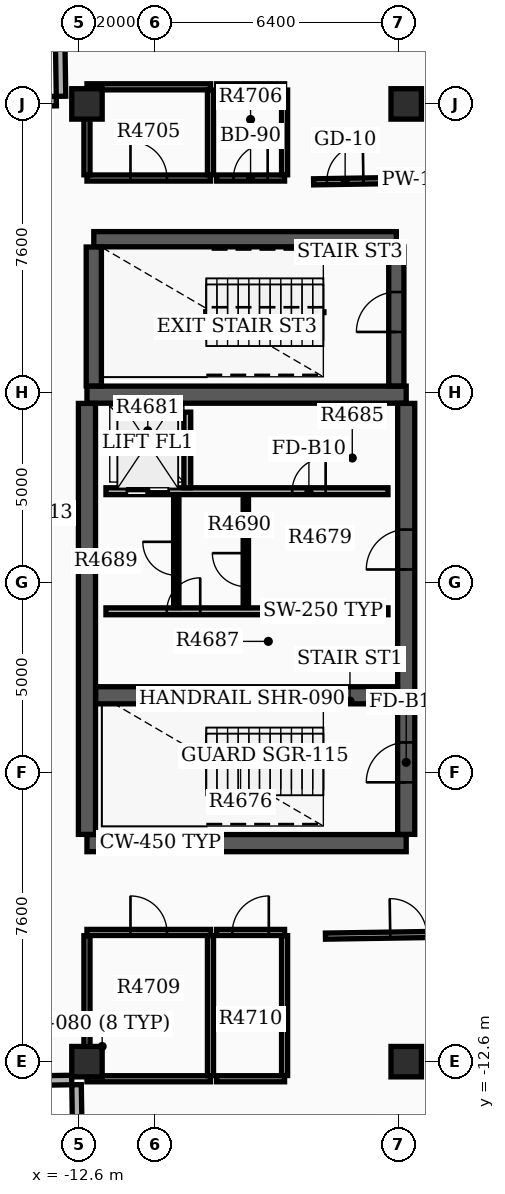
"""IFC4 building model, lengths in metres.
Left out: names, types, materials, properties, quantities, classifications, styles, units other than length and angle.
Written with IfcOpenShell. Run it as: python <this file> out.ifc"""

import sys

from ifc_helpers import new_model, si_unit, direction, frame, frame_2d, origin, origin_2d, place, context, subcontext, project, spatial, rectangle, extrude, element, fill, save


model = new_model("IFC4")
c1 = context("Model", 3, precision=1e-05, world=origin(), true_north=direction((0.0, 1.0)))
c2 = subcontext(c1, "Body", "Model", "MODEL_VIEW")
j1 = project(units=[si_unit("LENGTHUNIT", "METRE"), si_unit("PLANEANGLEUNIT", "RADIAN")], contexts=[c1])
p1 = place(None, origin())
s1 = spatial("IfcSite", under=j1, at=p1, CompositionType="ELEMENT")
p2 = place(p1, origin())
s2 = spatial("IfcBuilding", under=s1, at=p2, CompositionType="ELEMENT")
p3 = place(p2, frame((0.0, 0.0, 303.9)))
s3 = spatial("IfcBuildingStorey", under=s2, at=p3, CompositionType="ELEMENT", Elevation=303.9)
for number, where, z_axis, x_axis in (
    (1, (-12.4, -6.85, 0.0), (0.0, 0.0, 1.0), (1.0, 0.0, 0.0)),
    (2, (-12.4, 4.95, 0.0), (0.0, 0.0, 1.0), (1.0, 0.0, 0.0)),
):
    element("IfcWall", number, at=place(p3, frame(where, z_axis=z_axis, x_axis=x_axis)), inside=s3, PredefinedType="SHEAR", context=c2, shape_type="SweptSolid", body=[
        extrude(rectangle(XDim=8.4, YDim=0.45, at=frame_2d((4.2, 0.0))), origin(), (0.0, 0.0, 1.0), 4.25),
    ])
p4 = place(p3, frame((-12.4, -6.62, 0.0), z_axis=(0.0, 0.0, 1.0), x_axis=(0.0, 1.0, 0.0)))
e3 = element("IfcWall", 3, at=p4, inside=s3, PredefinedType="SHEAR", context=c2, shape_type="SweptSolid", body=[
    extrude(rectangle(XDim=11.34, YDim=0.45, at=frame_2d((5.67, 0.0))), origin(), (0.0, 0.0, 1.0), 4.25),
])
p5 = place(p3, frame((-4.0, -6.62, 0.0), z_axis=(0.0, 0.0, 1.0), x_axis=(0.0, 1.0, 0.0)))
e4 = element("IfcWall", 4, at=p5, inside=s3, PredefinedType="SHEAR", context=c2, shape_type="SweptSolid", body=[
    extrude(rectangle(XDim=11.34, YDim=0.45, at=frame_2d((5.67, 0.0))), origin(), (0.0, 0.0, 1.0), 4.25),
])
p6 = place(p5, frame((1.37, 0.0, 0.0)))
e5 = element("IfcOpeningElement", 5, at=p6, cuts=e4, PredefinedType="OPENING", context=c2, shape_type="SweptSolid", body=[
    extrude(rectangle(XDim=1.05, YDim=2.15, at=frame_2d((0.525, 1.075))), frame((0.0, 0.235, 0.0), z_axis=(0.0, -1.0, 0.0), x_axis=(1.0, 0.0, 0.0)), (0.0, 0.0, 1.0), 0.47),
])
p7 = place(p5, frame((6.97, 0.0, 0.0)))
e6 = element("IfcOpeningElement", 6, at=p7, cuts=e4, PredefinedType="OPENING", context=c2, shape_type="SweptSolid", body=[
    extrude(rectangle(XDim=1.05, YDim=2.15, at=frame_2d((0.525, 1.075))), frame((0.0, 0.235, 0.0), z_axis=(0.0, -1.0, 0.0), x_axis=(1.0, 0.0, 0.0)), (0.0, 0.0, 1.0), 0.47),
])
p8 = place(p3, frame((-12.17, -2.96, 0.0), z_axis=(0.0, 0.0, 1.0), x_axis=(1.0, 0.0, 0.0)))
e7 = element("IfcWall", 7, at=p8, inside=s3, PredefinedType="SHEAR", context=c2, shape_type="SweptSolid", body=[
    extrude(rectangle(XDim=7.94, YDim=0.45, at=frame_2d((3.97, 0.0))), origin(), (0.0, 0.0, 1.0), 4.25),
])
p9 = place(p3, frame((-12.22, 9.04, 0.0), z_axis=(0.0, 0.0, 1.0), x_axis=(1.0, 0.0, 0.0)))
e8 = element("IfcWall", 8, at=p9, inside=s3, PredefinedType="SHEAR", context=c2, shape_type="SweptSolid", body=[
    extrude(rectangle(XDim=7.96, YDim=0.4, at=frame_2d((3.98, 0.0))), origin(), (0.0, 0.0, 1.0), 4.25),
])
p10 = place(p3, frame((-12.22, 5.18, 0.0), z_axis=(0.0, 0.0, 1.0), x_axis=(0.0, 1.0, 0.0)))
e9 = element("IfcWall", 9, at=p10, inside=s3, PredefinedType="SHEAR", context=c2, shape_type="SweptSolid", body=[
    extrude(rectangle(XDim=3.655, YDim=0.4, at=frame_2d((1.828, 0.0))), origin(), (0.0, 0.0, 1.0), 4.25),
])
p11 = place(p3, frame((-4.26, 5.18, 0.0), z_axis=(0.0, 0.0, 1.0), x_axis=(0.0, 1.0, 0.0)))
e10 = element("IfcWall", 10, at=p11, inside=s3, PredefinedType="SHEAR", context=c2, shape_type="SweptSolid", body=[
    extrude(rectangle(XDim=3.655, YDim=0.4, at=frame_2d((1.828, 0.0))), origin(), (0.0, 0.0, 1.0), 4.25),
])
p12 = place(p11, frame((1.42, 0.0, 0.0)))
e11 = element("IfcOpeningElement", 11, at=p12, cuts=e10, PredefinedType="OPENING", context=c2, shape_type="SweptSolid", body=[
    extrude(rectangle(XDim=1.05, YDim=2.15, at=frame_2d((0.525, 1.075))), frame((0.0, 0.21, 0.0), z_axis=(0.0, -1.0, 0.0), x_axis=(1.0, 0.0, 0.0)), (0.0, 0.0, 1.0), 0.42),
])
for number, where, z_axis, x_axis in (
    (12, (-12.4, -12.6, 0.0), (0.0, 0.0, 1.0), (1.0, 0.0, 0.0)),
    (13, (-12.4, 12.6, 0.0), (0.0, 0.0, 1.0), (1.0, 0.0, 0.0)),
    (14, (-4.0, -12.6, 0.0), (0.0, 0.0, 1.0), (1.0, 0.0, 0.0)),
    (15, (-4.0, 12.6, 0.0), (0.0, 0.0, 1.0), (1.0, 0.0, 0.0)),
):
    element("IfcColumn", number, at=place(p3, frame(where, z_axis=z_axis, x_axis=x_axis)), inside=s3, PredefinedType="COLUMN", context=c2, shape_type="SweptSolid", body=[
        extrude(rectangle(XDim=0.8, YDim=0.8, at=origin_2d()), origin(), (0.0, 0.0, 1.0), 4.5),
    ])
p13 = place(p3, frame((-14.456, 12.655, 0.0), z_axis=(0.0, 0.0, 1.0), x_axis=(0.999877904354, 0.015626144237, 0.0)))
e16 = element("IfcWall", 16, at=p13, inside=s3, PredefinedType="STANDARD", context=c2, shape_type="SweptSolid", body=[
    extrude(rectangle(XDim=1.25, YDim=0.25, at=frame_2d((0.625, 0.0))), origin(), (0.0, 0.0, 1.0), 3.73),
])
p14 = place(p3, frame((-13.083, 12.801, 0.0), z_axis=(0.0, 0.0, 1.0), x_axis=(-0.015625635615, 0.999877912303, 0.0)))
e17 = element("IfcWall", 17, at=p14, inside=s3, PredefinedType="STANDARD", context=c2, shape_type="SweptSolid", body=[
    extrude(rectangle(XDim=1.5, YDim=0.25, at=frame_2d((0.75, 0.0))), origin(), (0.0, 0.0, 1.0), 3.73),
])
p15 = place(p3, frame((-14.051, -13.102, 0.0), z_axis=(0.0, 0.0, 1.0), x_axis=(0.999877904354, 0.015626144237, 0.0)))
e18 = element("IfcWall", 18, at=p15, inside=s3, PredefinedType="STANDARD", context=c2, shape_type="SweptSolid", body=[
    extrude(rectangle(XDim=1.25, YDim=0.25, at=frame_2d((0.625, 0.0))), origin(), (0.0, 0.0, 1.0), 3.73),
])
p16 = place(p3, frame((-12.674, -13.206, 0.0), z_axis=(0.0, 0.0, 1.0), x_axis=(0.015625635615, -0.999877912303, 0.0)))
e19 = element("IfcWall", 19, at=p16, inside=s3, PredefinedType="STANDARD", context=c2, shape_type="SweptSolid", body=[
    extrude(rectangle(XDim=1.5, YDim=0.25, at=frame_2d((0.75, 0.0))), origin(), (0.0, 0.0, 1.0), 3.73),
])
p17 = place(p3, frame((-11.9, 2.41, 0.0), z_axis=(0.0, 0.0, 1.0), x_axis=(1.0, 0.0, 0.0)))
e20 = element("IfcWall", 20, at=p17, inside=s3, PredefinedType="SOLIDWALL", context=c2, shape_type="SweptSolid", body=[
    extrude(rectangle(XDim=7.42, YDim=0.18, at=frame_2d((3.71, 0.0))), origin(), (0.0, 0.0, 1.0), 3.72),
])
p18 = place(p17, frame((0.55, 0.0, 0.0)))
e21 = element("IfcOpeningElement", 21, at=p18, cuts=e20, PredefinedType="OPENING", context=c2, shape_type="SweptSolid", body=[
    extrude(rectangle(XDim=1.1, YDim=2.15, at=frame_2d((0.55, 1.075))), frame((0.0, 0.1, 0.0), z_axis=(0.0, -1.0, 0.0), x_axis=(1.0, 0.0, 0.0)), (0.0, 0.0, 1.0), 0.2),
])
p19 = place(p17, frame((4.9, 0.0, 0.0)))
e22 = element("IfcOpeningElement", 22, at=p19, cuts=e20, PredefinedType="OPENING", context=c2, shape_type="SweptSolid", body=[
    extrude(rectangle(XDim=0.88, YDim=2.1, at=frame_2d((0.44, 1.05))), frame((0.0, 0.1, 0.0), z_axis=(0.0, -1.0, 0.0), x_axis=(1.0, 0.0, 0.0)), (0.0, 0.0, 1.0), 0.2),
])
p20 = place(p3, frame((-11.9, -0.75, 0.0), z_axis=(0.0, 0.0, 1.0), x_axis=(1.0, 0.0, 0.0)))
e23 = element("IfcWall", 23, at=p20, inside=s3, PredefinedType="SOLIDWALL", context=c2, shape_type="SweptSolid", body=[
    extrude(rectangle(XDim=7.42, YDim=0.18, at=frame_2d((3.71, 0.0))), origin(), (0.0, 0.0, 1.0), 3.72),
])
p21 = place(p20, frame((1.6, 0.0, 0.0)))
e24 = element("IfcOpeningElement", 24, at=p21, cuts=e23, PredefinedType="OPENING", context=c2, shape_type="SweptSolid", body=[
    extrude(rectangle(XDim=0.88, YDim=2.1, at=frame_2d((0.44, 1.05))), frame((0.0, 0.1, 0.0), z_axis=(0.0, -1.0, 0.0), x_axis=(1.0, 0.0, 0.0)), (0.0, 0.0, 1.0), 0.2),
])
p22 = place(p3, frame((-9.76, 2.5, 0.0), z_axis=(0.0, 0.0, 1.0), x_axis=(0.0, 1.0, 0.0)))
e25 = element("IfcWall", 25, at=p22, inside=s3, PredefinedType="SOLIDWALL", context=c2, shape_type="SweptSolid", body=[
    extrude(rectangle(XDim=1.99, YDim=0.18, at=frame_2d((0.995, 0.0))), origin(), (0.0, 0.0, 1.0), 3.72),
])
p23 = place(p3, frame((-8.22, -0.65, 0.0), z_axis=(0.0, 0.0, 1.0), x_axis=(0.0, 1.0, 0.0)))
e26 = element("IfcWall", 26, at=p23, inside=s3, PredefinedType="SOLIDWALL", context=c2, shape_type="SweptSolid", body=[
    extrude(rectangle(XDim=2.96, YDim=0.14, at=frame_2d((1.48, 0.0))), origin(), (0.0, 0.0, 1.0), 3.72),
])
p24 = place(p23, frame((0.55, 0.0, 0.0)))
e27 = element("IfcOpeningElement", 27, at=p24, cuts=e26, PredefinedType="OPENING", context=c2, shape_type="SweptSolid", body=[
    extrude(rectangle(XDim=0.88, YDim=2.1, at=frame_2d((0.44, 1.05))), frame((0.0, 0.08, 0.0), z_axis=(0.0, -1.0, 0.0), x_axis=(1.0, 0.0, 0.0)), (0.0, 0.0, 1.0), 0.16),
])
p25 = place(p3, frame((-10.05, -0.652, 0.0), z_axis=(0.0, 0.0, 1.0), x_axis=(0.0, 1.0, 0.0)))
e28 = element("IfcWall", 28, at=p25, inside=s3, PredefinedType="PARTITIONING", context=c2, shape_type="SweptSolid", body=[
    extrude(rectangle(XDim=2.962, YDim=0.14, at=frame_2d((1.481, 0.0))), origin(), (0.0, 0.0, 1.0), 3.72),
])
p26 = place(p25, frame((0.85, 0.0, 0.0)))
e29 = element("IfcOpeningElement", 29, at=p26, cuts=e28, PredefinedType="OPENING", context=c2, shape_type="SweptSolid", body=[
    extrude(rectangle(XDim=0.88, YDim=2.1, at=frame_2d((0.44, 1.05))), frame((0.0, 0.08, 0.0), z_axis=(0.0, -1.0, 0.0), x_axis=(1.0, 0.0, 0.0)), (0.0, 0.0, 1.0), 0.16),
])
p27 = place(p3, frame((-6.437, 10.55, 0.0), z_axis=(0.0, 0.0, 1.0), x_axis=(0.999876776552, 0.015698143603, 0.0)))
e30 = element("IfcWall", 30, at=p27, inside=s3, PredefinedType="PARTITIONING", context=c2, shape_type="SweptSolid", body=[
    extrude(rectangle(XDim=4.37, YDim=0.16, at=frame_2d((2.185, 0.0))), origin(), (0.0, 0.0, 1.0), 3.72),
])
p28 = place(p27, frame((0.35, 0.0, 0.0)))
e31 = element("IfcOpeningElement", 31, at=p28, cuts=e30, PredefinedType="OPENING", context=c2, shape_type="SweptSolid", body=[
    extrude(rectangle(XDim=0.96, YDim=2.15, at=frame_2d((0.48, 1.075))), frame((0.0, 0.09, 0.0), z_axis=(0.0, -1.0, 0.0), x_axis=(1.0, 0.0, 0.0)), (0.0, 0.0, 1.0), 0.18),
])
p29 = place(p3, frame((-6.125, -9.297, 0.0), z_axis=(0.0, 0.0, 1.0), x_axis=(0.999876762784, 0.015699020525, 0.0)))
e32 = element("IfcWall", 32, at=p29, inside=s3, PredefinedType="PARTITIONING", context=c2, shape_type="SweptSolid", body=[
    extrude(rectangle(XDim=4.37, YDim=0.16, at=frame_2d((2.185, 0.0))), origin(), (0.0, 0.0, 1.0), 3.72),
])
p30 = place(p29, frame((1.705, 0.0, 0.0)))
e33 = element("IfcOpeningElement", 33, at=p30, cuts=e32, PredefinedType="OPENING", context=c2, shape_type="SweptSolid", body=[
    extrude(rectangle(XDim=0.96, YDim=2.15, at=frame_2d((0.48, 1.075))), frame((0.0, 0.09, 0.0), z_axis=(0.0, -1.0, 0.0), x_axis=(1.0, 0.0, 0.0)), (0.0, 0.0, 1.0), 0.18),
])
p31 = place(p3, frame((-12.4, 10.65, 0.0), z_axis=(0.0, 0.0, 1.0), x_axis=(1.0, 0.0, 0.0)))
e34 = element("IfcWall", 34, at=p31, inside=s3, PredefinedType="PARTITIONING", context=c2, shape_type="SweptSolid", body=[
    extrude(rectangle(XDim=3.25, YDim=0.16, at=frame_2d((1.625, 0.0))), origin(), (0.0, 0.0, 1.0), 3.72),
])
p32 = place(p31, frame((1.145, 0.0, 0.0)))
e35 = element("IfcOpeningElement", 35, at=p32, cuts=e34, PredefinedType="OPENING", context=c2, shape_type="SweptSolid", body=[
    extrude(rectangle(XDim=0.96, YDim=2.15, at=frame_2d((0.48, 1.075))), frame((0.0, 0.09, 0.0), z_axis=(0.0, -1.0, 0.0), x_axis=(1.0, 0.0, 0.0)), (0.0, 0.0, 1.0), 0.18),
])
p33 = place(p3, frame((-12.4, 13.05, 0.0), z_axis=(0.0, 0.0, 1.0), x_axis=(1.0, 0.0, 0.0)))
e36 = element("IfcWall", 36, at=p33, inside=s3, PredefinedType="PARTITIONING", context=c2, shape_type="SweptSolid", body=[
    extrude(rectangle(XDim=3.25, YDim=0.16, at=frame_2d((1.625, 0.0))), origin(), (0.0, 0.0, 1.0), 3.72),
])
for number, where, z_axis, x_axis in (
    (37, (-12.4, 10.735, 0.0), (0.0, 0.0, 1.0), (0.0, 1.0, 0.0)),
    (38, (-9.15, 10.735, 0.0), (0.0, 0.0, 1.0), (0.0, 1.0, 0.0)),
):
    element("IfcWall", number, at=place(p3, frame(where, z_axis=z_axis, x_axis=x_axis)), inside=s3, PredefinedType="PARTITIONING", context=c2, shape_type="SweptSolid", body=[
        extrude(rectangle(XDim=2.23, YDim=0.16, at=frame_2d((1.115, 0.0))), origin(), (0.0, 0.0, 1.0), 3.72),
    ])
p34 = place(p3, frame((-8.99, 10.65, 0.0), z_axis=(0.0, 0.0, 1.0), x_axis=(1.0, 0.0, 0.0)))
e39 = element("IfcWall", 39, at=p34, inside=s3, PredefinedType="PARTITIONING", context=c2, shape_type="SweptSolid", body=[
    extrude(rectangle(XDim=1.79, YDim=0.16, at=frame_2d((0.895, 0.0))), origin(), (0.0, 0.0, 1.0), 3.72),
])
p35 = place(p34, frame((0.445, 0.0, 0.0)))
e40 = element("IfcOpeningElement", 40, at=p35, cuts=e39, PredefinedType="OPENING", context=c2, shape_type="SweptSolid", body=[
    extrude(rectangle(XDim=0.9, YDim=2.15, at=frame_2d((0.45, 1.075))), frame((0.0, 0.09, 0.0), z_axis=(0.0, -1.0, 0.0), x_axis=(1.0, 0.0, 0.0)), (0.0, 0.0, 1.0), 0.18),
])
p36 = place(p3, frame((-8.99, 13.05, 0.0), z_axis=(0.0, 0.0, 1.0), x_axis=(1.0, 0.0, 0.0)))
e41 = element("IfcWall", 41, at=p36, inside=s3, PredefinedType="PARTITIONING", context=c2, shape_type="SweptSolid", body=[
    extrude(rectangle(XDim=1.79, YDim=0.16, at=frame_2d((0.895, 0.0))), origin(), (0.0, 0.0, 1.0), 3.72),
])
p37 = place(p3, frame((-7.2, 10.735, 0.0), z_axis=(0.0, 0.0, 1.0), x_axis=(0.0, 1.0, 0.0)))
e42 = element("IfcWall", 42, at=p37, inside=s3, PredefinedType="PARTITIONING", context=c2, shape_type="SweptSolid", body=[
    extrude(rectangle(XDim=2.23, YDim=0.16, at=frame_2d((1.115, 0.0))), origin(), (0.0, 0.0, 1.0), 3.72),
])
p38 = place(p3, frame((-12.4, -13.05, 0.0), z_axis=(0.0, 0.0, 1.0), x_axis=(1.0, 0.0, 0.0)))
e43 = element("IfcWall", 43, at=p38, inside=s3, PredefinedType="PARTITIONING", context=c2, shape_type="SweptSolid", body=[
    extrude(rectangle(XDim=3.25, YDim=0.16, at=frame_2d((1.625, 0.0))), origin(), (0.0, 0.0, 1.0), 3.72),
])
p39 = place(p3, frame((-12.4, -9.2, 0.0), z_axis=(0.0, 0.0, 1.0), x_axis=(1.0, 0.0, 0.0)))
e44 = element("IfcWall", 44, at=p39, inside=s3, PredefinedType="PARTITIONING", context=c2, shape_type="SweptSolid", body=[
    extrude(rectangle(XDim=3.25, YDim=0.16, at=frame_2d((1.625, 0.0))), origin(), (0.0, 0.0, 1.0), 3.72),
])
p40 = place(p39, frame((1.145, 0.0, 0.0)))
e45 = element("IfcOpeningElement", 45, at=p40, cuts=e44, PredefinedType="OPENING", context=c2, shape_type="SweptSolid", body=[
    extrude(rectangle(XDim=0.96, YDim=2.15, at=frame_2d((0.48, 1.075))), frame((0.0, 0.09, 0.0), z_axis=(0.0, -1.0, 0.0), x_axis=(1.0, 0.0, 0.0)), (0.0, 0.0, 1.0), 0.18),
])
for number, where, z_axis, x_axis in (
    (46, (-12.4, -12.965, 0.0), (0.0, 0.0, 1.0), (0.0, 1.0, 0.0)),
    (47, (-9.15, -12.965, 0.0), (0.0, 0.0, 1.0), (0.0, 1.0, 0.0)),
):
    element("IfcWall", number, at=place(p3, frame(where, z_axis=z_axis, x_axis=x_axis)), inside=s3, PredefinedType="PARTITIONING", context=c2, shape_type="SweptSolid", body=[
        extrude(rectangle(XDim=3.68, YDim=0.16, at=frame_2d((1.84, 0.0))), origin(), (0.0, 0.0, 1.0), 3.72),
    ])
p41 = place(p3, frame((-8.99, -13.05, 0.0), z_axis=(0.0, 0.0, 1.0), x_axis=(1.0, 0.0, 0.0)))
e48 = element("IfcWall", 48, at=p41, inside=s3, PredefinedType="PARTITIONING", context=c2, shape_type="SweptSolid", body=[
    extrude(rectangle(XDim=1.79, YDim=0.16, at=frame_2d((0.895, 0.0))), origin(), (0.0, 0.0, 1.0), 3.72),
])
p42 = place(p3, frame((-8.99, -9.2, 0.0), z_axis=(0.0, 0.0, 1.0), x_axis=(1.0, 0.0, 0.0)))
e49 = element("IfcWall", 49, at=p42, inside=s3, PredefinedType="PARTITIONING", context=c2, shape_type="SweptSolid", body=[
    extrude(rectangle(XDim=1.79, YDim=0.16, at=frame_2d((0.895, 0.0))), origin(), (0.0, 0.0, 1.0), 3.72),
])
p43 = place(p42, frame((0.415, 0.0, 0.0)))
e50 = element("IfcOpeningElement", 50, at=p43, cuts=e49, PredefinedType="OPENING", context=c2, shape_type="SweptSolid", body=[
    extrude(rectangle(XDim=0.96, YDim=2.15, at=frame_2d((0.48, 1.075))), frame((0.0, 0.09, 0.0), z_axis=(0.0, -1.0, 0.0), x_axis=(1.0, 0.0, 0.0)), (0.0, 0.0, 1.0), 0.18),
])
p44 = place(p3, frame((-7.2, -12.965, 0.0), z_axis=(0.0, 0.0, 1.0), x_axis=(0.0, 1.0, 0.0)))
e51 = element("IfcWall", 51, at=p44, inside=s3, PredefinedType="PARTITIONING", context=c2, shape_type="SweptSolid", body=[
    extrude(rectangle(XDim=3.68, YDim=0.16, at=frame_2d((1.84, 0.0))), origin(), (0.0, 0.0, 1.0), 3.72),
])
p45 = place(p6, origin())
e52 = element("IfcDoor", 52, at=p45, inside=s3, OperationType="SINGLE_SWING_LEFT", PredefinedType="DOOR", context=c2, shape_type="SweptSolid", body=[
    extrude(rectangle(XDim=1.05, YDim=2.15, at=frame_2d((0.525, 1.075))), frame((0.0, 0.025, 0.0), z_axis=(0.0, -1.0, 0.0), x_axis=(1.0, 0.0, 0.0)), (0.0, 0.0, 1.0), 0.05),
])
fill(e5, e52)
p46 = place(p7, origin())
e53 = element("IfcDoor", 53, at=p46, inside=s3, OperationType="SINGLE_SWING_LEFT", PredefinedType="DOOR", context=c2, shape_type="SweptSolid", body=[
    extrude(rectangle(XDim=1.05, YDim=2.15, at=frame_2d((0.525, 1.075))), frame((0.0, 0.025, 0.0), z_axis=(0.0, -1.0, 0.0), x_axis=(1.0, 0.0, 0.0)), (0.0, 0.0, 1.0), 0.05),
])
fill(e6, e53)
p47 = place(p12, origin())
e54 = element("IfcDoor", 54, at=p47, inside=s3, OperationType="SINGLE_SWING_LEFT", PredefinedType="DOOR", context=c2, shape_type="SweptSolid", body=[
    extrude(rectangle(XDim=1.05, YDim=2.15, at=frame_2d((0.525, 1.075))), frame((0.0, 0.025, 0.0), z_axis=(0.0, -1.0, 0.0), x_axis=(1.0, 0.0, 0.0)), (0.0, 0.0, 1.0), 0.05),
])
fill(e11, e54)
p48 = place(p18, origin())
e55 = element("IfcDoor", 55, at=p48, inside=s3, OperationType="DOUBLE_DOOR_SLIDING", PredefinedType="DOOR", context=c2, shape_type="SweptSolid", body=[
    extrude(rectangle(XDim=1.1, YDim=2.15, at=frame_2d((0.55, 1.075))), frame((0.0, 0.025, 0.0), z_axis=(0.0, -1.0, 0.0), x_axis=(1.0, 0.0, 0.0)), (0.0, 0.0, 1.0), 0.05),
])
fill(e21, e55)
p49 = place(p19, origin())
e56 = element("IfcDoor", 56, at=p49, inside=s3, OperationType="SINGLE_SWING_RIGHT", PredefinedType="DOOR", context=c2, shape_type="SweptSolid", body=[
    extrude(rectangle(XDim=0.88, YDim=2.1, at=frame_2d((0.44, 1.05))), frame((0.0, 0.025, 0.0), z_axis=(0.0, -1.0, 0.0), x_axis=(1.0, 0.0, 0.0)), (0.0, 0.0, 1.0), 0.05),
])
fill(e22, e56)
p50 = place(p21, origin())
e57 = element("IfcDoor", 57, at=p50, inside=s3, OperationType="SINGLE_SWING_RIGHT", PredefinedType="DOOR", context=c2, shape_type="SweptSolid", body=[
    extrude(rectangle(XDim=0.88, YDim=2.1, at=frame_2d((0.44, 1.05))), frame((0.0, 0.025, 0.0), z_axis=(0.0, -1.0, 0.0), x_axis=(1.0, 0.0, 0.0)), (0.0, 0.0, 1.0), 0.05),
])
fill(e24, e57)
p51 = place(p24, origin())
e58 = element("IfcDoor", 58, at=p51, inside=s3, OperationType="SINGLE_SWING_RIGHT", PredefinedType="DOOR", context=c2, shape_type="SweptSolid", body=[
    extrude(rectangle(XDim=0.88, YDim=2.1, at=frame_2d((0.44, 1.05))), frame((0.0, 0.025, 0.0), z_axis=(0.0, -1.0, 0.0), x_axis=(1.0, 0.0, 0.0)), (0.0, 0.0, 1.0), 0.05),
])
fill(e27, e58)
p52 = place(p26, origin())
e59 = element("IfcDoor", 59, at=p52, inside=s3, OperationType="SINGLE_SWING_RIGHT", PredefinedType="DOOR", context=c2, shape_type="SweptSolid", body=[
    extrude(rectangle(XDim=0.88, YDim=2.1, at=frame_2d((0.44, 1.05))), frame((0.0, 0.025, 0.0), z_axis=(0.0, -1.0, 0.0), x_axis=(1.0, 0.0, 0.0)), (0.0, 0.0, 1.0), 0.05),
])
fill(e29, e59)
p53 = place(p28, origin())
e60 = element("IfcDoor", 60, at=p53, inside=s3, OperationType="SINGLE_SWING_RIGHT", PredefinedType="DOOR", context=c2, shape_type="SweptSolid", body=[
    extrude(rectangle(XDim=0.96, YDim=2.15, at=frame_2d((0.48, 1.075))), frame((0.0, 0.025, 0.0), z_axis=(0.0, -1.0, 0.0), x_axis=(1.0, 0.0, 0.0)), (0.0, 0.0, 1.0), 0.05),
])
fill(e31, e60)
p54 = place(p30, origin())
e61 = element("IfcDoor", 61, at=p54, inside=s3, OperationType="SINGLE_SWING_LEFT", PredefinedType="DOOR", context=c2, shape_type="SweptSolid", body=[
    extrude(rectangle(XDim=0.96, YDim=2.15, at=frame_2d((0.48, 1.075))), frame((0.0, 0.025, 0.0), z_axis=(0.0, -1.0, 0.0), x_axis=(1.0, 0.0, 0.0)), (0.0, 0.0, 1.0), 0.05),
])
fill(e33, e61)
p55 = place(p32, origin())
e62 = element("IfcDoor", 62, at=p55, inside=s3, OperationType="SINGLE_SWING_LEFT", PredefinedType="DOOR", context=c2, shape_type="SweptSolid", body=[
    extrude(rectangle(XDim=0.96, YDim=2.15, at=frame_2d((0.48, 1.075))), frame((0.0, 0.025, 0.0), z_axis=(0.0, -1.0, 0.0), x_axis=(1.0, 0.0, 0.0)), (0.0, 0.0, 1.0), 0.05),
])
fill(e35, e62)
p56 = place(p35, origin())
e63 = element("IfcDoor", 63, at=p56, inside=s3, OperationType="SINGLE_SWING_RIGHT", PredefinedType="DOOR", context=c2, shape_type="SweptSolid", body=[
    extrude(rectangle(XDim=0.9, YDim=2.15, at=frame_2d((0.45, 1.075))), frame((0.0, 0.025, 0.0), z_axis=(0.0, -1.0, 0.0), x_axis=(1.0, 0.0, 0.0)), (0.0, 0.0, 1.0), 0.05),
])
fill(e40, e63)
p57 = place(p40, origin())
e64 = element("IfcDoor", 64, at=p57, inside=s3, OperationType="SINGLE_SWING_LEFT", PredefinedType="DOOR", context=c2, shape_type="SweptSolid", body=[
    extrude(rectangle(XDim=0.96, YDim=2.15, at=frame_2d((0.48, 1.075))), frame((0.0, 0.025, 0.0), z_axis=(0.0, -1.0, 0.0), x_axis=(1.0, 0.0, 0.0)), (0.0, 0.0, 1.0), 0.05),
])
fill(e45, e64)
p58 = place(p43, origin())
e65 = element("IfcDoor", 65, at=p58, inside=s3, OperationType="SINGLE_SWING_RIGHT", PredefinedType="DOOR", context=c2, shape_type="SweptSolid", body=[
    extrude(rectangle(XDim=0.96, YDim=2.15, at=frame_2d((0.48, 1.075))), frame((0.0, 0.025, 0.0), z_axis=(0.0, -1.0, 0.0), x_axis=(1.0, 0.0, 0.0)), (0.0, 0.0, 1.0), 0.05),
])
fill(e50, e65)
save(model, sys.argv[1])
